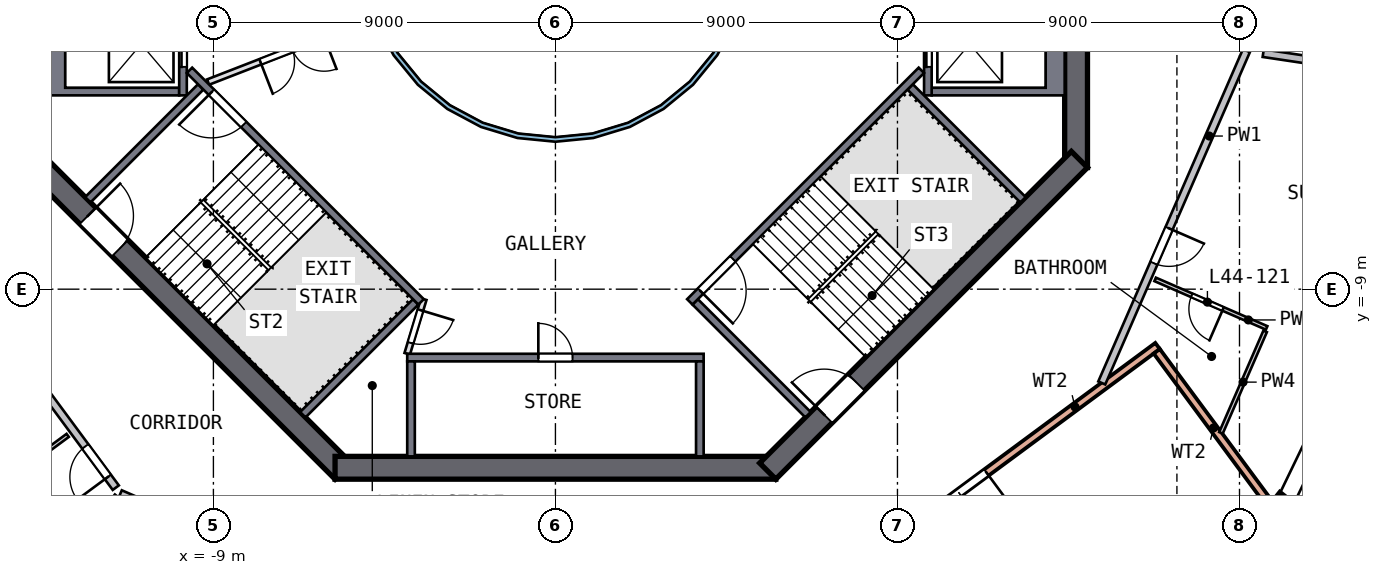
"""IFC4 building model, lengths in metres.
Left out: names, types, materials, properties, quantities, classifications, styles, units other than length and angle.
Written with IfcOpenShell. Run it as: python <this file> out.ifc"""

import sys

from ifc_helpers import new_model, si_unit, direction, frame, frame_2d, origin, origin_2d, place, context, subcontext, project, spatial, polyline, rectangle, outline, extrude, element, fill, save


model = new_model("IFC4")
c1 = context("Model", 3, precision=1e-05, world=origin(), true_north=direction((0.0, 1.0)))
c2 = subcontext(c1, "Body", "Model", "MODEL_VIEW")
j1 = project(units=[si_unit("LENGTHUNIT", "METRE"), si_unit("PLANEANGLEUNIT", "RADIAN")], contexts=[c1])
p1 = place(None, origin())
s1 = spatial("IfcSite", under=j1, at=p1, CompositionType="ELEMENT")
p2 = place(p1, origin())
s2 = spatial("IfcBuilding", under=s1, at=p2, CompositionType="ELEMENT")
p3 = place(p2, frame((0.0, 0.0, 183.5)))
s3 = spatial("IfcBuildingStorey", under=s2, at=p3, CompositionType="ELEMENT", Elevation=183.5)
p4 = place(p3, frame((18.977, -15.106, 0.0), z_axis=(0.07108209, 0.090848232, 0.993324688), x_axis=(-0.618726057, -0.777092625, 0.115347815)))
e1 = element("IfcColumn", 1, at=p4, inside=s3, PredefinedType="COLUMN", context=c2, shape_type="SweptSolid", body=[
    extrude(rectangle(XDim=1.0, YDim=0.8, at=origin_2d()), origin(), (0.0, 0.0, 1.0), 3.211),
])
p5 = place(p3, frame((13.7, -5.799, 0.0), z_axis=(0.0, 0.0, 1.0), x_axis=(0.0, 1.0, 0.0)))
e2 = element("IfcWall", 2, at=p5, inside=s3, PredefinedType="SHEAR", context=c2, shape_type="SweptSolid", body=[
    extrude(rectangle(XDim=11.598, YDim=0.6, at=frame_2d((5.799, 0.0))), origin(), (0.0, 0.0, 1.0), 3.5),
])
p6 = place(p5, frame((4.899, 0.0, 0.0)))
e3 = element("IfcOpeningElement", 3, at=p6, cuts=e2, PredefinedType="OPENING", context=c2, shape_type="SweptSolid", body=[
    extrude(rectangle(XDim=1.8, YDim=2.1, at=frame_2d((0.9, 1.05))), frame((0.0, 0.31, 0.0), z_axis=(0.0, -1.0, 0.0), x_axis=(1.0, 0.0, 0.0)), (0.0, 0.0, 1.0), 0.62),
])
p7 = place(p3, frame((-13.788, -5.587, 0.0), z_axis=(0.0, 0.0, 1.0), x_axis=(0.707106781, -0.707106781, 0.0)))
e4 = element("IfcWall", 4, at=p7, inside=s3, PredefinedType="SHEAR", context=c2, shape_type="SweptSolid", body=[
    extrude(rectangle(XDim=11.598, YDim=0.6, at=frame_2d((5.799, 0.0))), origin(), (0.0, 0.0, 1.0), 3.5),
])
p8 = place(p7, frame((2.099, 0.0, 0.0)))
e5 = element("IfcOpeningElement", 5, at=p8, cuts=e4, PredefinedType="OPENING", context=c2, shape_type="SweptSolid", body=[
    extrude(rectangle(XDim=1.2, YDim=2.1, at=frame_2d((0.6, 1.05))), frame((0.0, 0.31, 0.0), z_axis=(0.0, -1.0, 0.0), x_axis=(1.0, 0.0, 0.0)), (0.0, 0.0, 1.0), 0.62),
])
p9 = place(p3, frame((-5.799, -13.7, 0.0), z_axis=(0.0, 0.0, 1.0), x_axis=(1.0, 0.0, 0.0)))
e6 = element("IfcWall", 6, at=p9, inside=s3, PredefinedType="SHEAR", context=c2, shape_type="SweptSolid", body=[
    extrude(rectangle(XDim=11.598, YDim=0.6, at=frame_2d((5.799, 0.0))), origin(), (0.0, 0.0, 1.0), 3.5),
])
p10 = place(p3, frame((5.587, -13.788, 0.0), z_axis=(0.0, 0.0, 1.0), x_axis=(0.707106781, 0.707106781, 0.0)))
e7 = element("IfcWall", 7, at=p10, inside=s3, PredefinedType="SHEAR", context=c2, shape_type="SweptSolid", body=[
    extrude(rectangle(XDim=11.598, YDim=0.6, at=frame_2d((5.799, 0.0))), origin(), (0.0, 0.0, 1.0), 3.5),
])
p11 = place(p10, frame((2.099, 0.0, 0.0)))
e8 = element("IfcOpeningElement", 8, at=p11, cuts=e7, PredefinedType="OPENING", context=c2, shape_type="SweptSolid", body=[
    extrude(rectangle(XDim=1.2, YDim=2.1, at=frame_2d((0.6, 1.05))), frame((0.0, 0.31, 0.0), z_axis=(0.0, -1.0, 0.0), x_axis=(1.0, 0.0, 0.0)), (0.0, 0.0, 1.0), 0.62),
])
p12 = place(p3, frame((15.844, -10.495, 0.0), z_axis=(0.0, 0.0, 1.0), x_axis=(-0.804058258, -0.594550517, 0.0)))
e9 = element("IfcWall", 9, at=p12, inside=s3, PredefinedType="SOLIDWALL", context=c2, shape_type="SweptSolid", body=[
    extrude(rectangle(XDim=13.0, YDim=0.2, at=frame_2d((6.5, 0.0))), origin(), (0.0, 0.0, 1.0), 3.19),
])
p13 = place(p12, frame((5.6, 0.0, 0.0)))
e10 = element("IfcOpeningElement", 10, at=p13, cuts=e9, PredefinedType="OPENING", context=c2, shape_type="SweptSolid", body=[
    extrude(rectangle(XDim=1.8, YDim=2.4, at=frame_2d((0.9, 1.2))), frame((0.0, 0.11, 0.0), z_axis=(0.0, -1.0, 0.0), x_axis=(1.0, 0.0, 0.0)), (0.0, 0.0, 1.0), 0.22),
])
p14 = place(p3, frame((18.808, -14.671, 0.0), z_axis=(0.0, 0.0, 1.0), x_axis=(-0.594546939, 0.804060904, 0.0)))
e11 = element("IfcWall", 11, at=p14, inside=s3, PredefinedType="SOLIDWALL", context=c2, shape_type="SweptSolid", body=[
    extrude(rectangle(XDim=5.02, YDim=0.2, at=frame_2d((2.51, 0.0))), origin(), (0.0, 0.0, 1.0), 3.19),
])
p15 = place(p3, origin())
e12 = element("IfcWall", 12, at=p15, inside=s3, PredefinedType="SOLIDWALL", context=c2, shape_type="SweptSolid", body=[
    extrude(outline(polyline([(13.4, -3.9), (9.9, -3.9), (9.9, -3.7), (12.9, -3.7), (12.9, -1.4), (9.9, -1.4), (9.9, -1.2), (13.4, -1.2), (13.4, -3.9)])), origin(), (0.0, 0.0, 1.0), 3.19),
])
p16 = place(p3, frame((9.8, -1.2, 0.0), z_axis=(0.0, 0.0, 1.0), x_axis=(0.0, -1.0, 0.0)))
e13 = element("IfcWall", 13, at=p16, inside=s3, PredefinedType="SOLIDWALL", context=c2, shape_type="SweptSolid", body=[
    extrude(rectangle(XDim=2.7, YDim=0.2, at=frame_2d((1.35, 0.0))), origin(), (0.0, 0.0, 1.0), 3.19),
])
p17 = place(p16, frame((0.75, 0.0, 0.0)))
e14 = element("IfcOpeningElement", 14, at=p17, cuts=e13, PredefinedType="OPENING", context=c2, shape_type="SweptSolid", body=[
    extrude(rectangle(XDim=1.2, YDim=2.1, at=frame_2d((0.6, 1.05))), frame((0.0, 0.11, 0.0), z_axis=(0.0, -1.0, 0.0), x_axis=(1.0, 0.0, 0.0)), (0.0, 0.0, 1.0), 0.22),
])
p18 = place(p3, origin())
e15 = element("IfcWall", 15, at=p18, inside=s3, PredefinedType="SOLIDWALL", context=c2, shape_type="SweptSolid", body=[
    extrude(outline(polyline([(-13.4, -3.9), (-13.4, -1.2), (-9.9, -1.2), (-9.9, -1.4), (-12.9, -1.4), (-12.9, -3.7), (-9.9, -3.7), (-9.9, -3.9), (-13.4, -3.9)])), origin(), (0.0, 0.0, 1.0), 3.19),
])
p19 = place(p3, frame((-9.8, -1.2, 0.0), z_axis=(0.0, 0.0, 1.0), x_axis=(0.0, -1.0, 0.0)))
e16 = element("IfcWall", 16, at=p19, inside=s3, PredefinedType="SOLIDWALL", context=c2, shape_type="SweptSolid", body=[
    extrude(rectangle(XDim=2.7, YDim=0.2, at=frame_2d((1.35, 0.0))), origin(), (0.0, 0.0, 1.0), 3.19),
])
p20 = place(p19, frame((0.75, 0.0, 0.0)))
e17 = element("IfcOpeningElement", 17, at=p20, cuts=e16, PredefinedType="OPENING", context=c2, shape_type="SweptSolid", body=[
    extrude(rectangle(XDim=1.2, YDim=2.1, at=frame_2d((0.6, 1.05))), frame((0.0, 0.11, 0.0), z_axis=(0.0, -1.0, 0.0), x_axis=(1.0, 0.0, 0.0)), (0.0, 0.0, 1.0), 0.22),
])
p21 = place(p3, frame((-3.9, -10.8, 0.0), z_axis=(0.0, 0.0, 1.0), x_axis=(1.0, 0.0, 0.0)))
e18 = element("IfcWall", 18, at=p21, inside=s3, PredefinedType="SOLIDWALL", context=c2, shape_type="SweptSolid", body=[
    extrude(rectangle(XDim=7.8, YDim=0.2, at=frame_2d((3.9, 0.0))), origin(), (0.0, 0.0, 1.0), 3.19),
])
p22 = place(p21, frame((3.45, 0.0, 0.0)))
e19 = element("IfcOpeningElement", 19, at=p22, cuts=e18, PredefinedType="OPENING", context=c2, shape_type="SweptSolid", body=[
    extrude(rectangle(XDim=0.9, YDim=2.1, at=frame_2d((0.45, 1.05))), frame((0.0, 0.11, 0.0), z_axis=(0.0, -1.0, 0.0), x_axis=(1.0, 0.0, 0.0)), (0.0, 0.0, 1.0), 0.22),
])
for number, where, z_axis, x_axis in (
    (20, (-3.8, -10.9, 0.0), (0.0, 0.0, 1.0), (0.0, -1.0, 0.0)),
    (21, (3.8, -10.9, 0.0), (0.0, 0.0, 1.0), (0.0, -1.0, 0.0)),
):
    element("IfcWall", number, at=place(p3, frame(where, z_axis=z_axis, x_axis=x_axis)), inside=s3, PredefinedType="SOLIDWALL", context=c2, shape_type="SweptSolid", body=[
        extrude(rectangle(XDim=2.5, YDim=0.2, at=frame_2d((1.25, 0.0))), origin(), (0.0, 0.0, 1.0), 3.19),
    ])
p23 = place(p3, frame((-3.535, -9.334, 0.0), z_axis=(0.0, 0.0, 1.0), x_axis=(-0.707120946, 0.707092617, 0.0)))
e22 = element("IfcWall", 22, at=p23, inside=s3, PredefinedType="SOLIDWALL", context=c2, shape_type="SweptSolid", body=[
    extrude(rectangle(XDim=8.618, YDim=0.2, at=frame_2d((4.309, 0.0))), origin(), (0.0, 0.0, 1.0), 3.19),
])
p24 = place(p23, frame((6.6, 0.0, 0.0)))
e23 = element("IfcOpeningElement", 23, at=p24, cuts=e22, PredefinedType="OPENING", context=c2, shape_type="SweptSolid", body=[
    extrude(rectangle(XDim=1.2, YDim=2.1, at=frame_2d((0.6, 1.05))), frame((0.0, 0.11, 0.0), z_axis=(0.0, -1.0, 0.0), x_axis=(1.0, 0.0, 0.0)), (0.0, 0.0, 1.0), 0.22),
])
for number, where, z_axis, x_axis in (
    (24, (-9.334, -3.677, 0.0), (0.0, 0.0, 1.0), (-0.707, -0.707, 0.0)),
    (25, (-3.677, -9.334, 0.0), (0.0, 0.0, 1.0), (-0.707, -0.707, 0.0)),
):
    element("IfcWall", number, at=place(p3, frame(where, z_axis=z_axis, x_axis=x_axis)), inside=s3, PredefinedType="SOLIDWALL", context=c2, shape_type="SweptSolid", body=[
        extrude(rectangle(XDim=4.2, YDim=0.2, at=frame_2d((2.1, 0.0))), origin(), (0.0, 0.0, 1.0), 3.19),
    ])
p25 = place(p3, frame((9.629, -3.24, 0.0), z_axis=(0.0, 0.0, 1.0), x_axis=(-0.707120946, -0.707092617, 0.0)))
e26 = element("IfcWall", 26, at=p25, inside=s3, PredefinedType="SOLIDWALL", context=c2, shape_type="SweptSolid", body=[
    extrude(rectangle(XDim=8.618, YDim=0.2, at=frame_2d((4.309, 0.0))), origin(), (0.0, 0.0, 1.0), 3.19),
])
p26 = place(p25, frame((7.018, 0.0, 0.0)))
e27 = element("IfcOpeningElement", 27, at=p26, cuts=e26, PredefinedType="OPENING", context=c2, shape_type="SweptSolid", body=[
    extrude(rectangle(XDim=1.2, YDim=2.1, at=frame_2d((0.6, 1.05))), frame((0.0, 0.11, 0.0), z_axis=(0.0, -1.0, 0.0), x_axis=(1.0, 0.0, 0.0)), (0.0, 0.0, 1.0), 0.22),
])
for number, where, z_axis, x_axis in (
    (28, (3.677, -9.334, 0.0), (0.0, 0.0, 1.0), (0.707, -0.707, 0.0)),
    (29, (9.334, -3.677, 0.0), (0.0, 0.0, 1.0), (0.707, -0.707, 0.0)),
):
    element("IfcWall", number, at=place(p3, frame(where, z_axis=z_axis, x_axis=x_axis)), inside=s3, PredefinedType="SOLIDWALL", context=c2, shape_type="SweptSolid", body=[
        extrude(rectangle(XDim=4.2, YDim=0.2, at=frame_2d((2.1, 0.0))), origin(), (0.0, 0.0, 1.0), 3.19),
    ])
p27 = place(p3, frame((-3.465, -9.263, 0.0), z_axis=(0.0, 0.0, 1.0), x_axis=(-0.289808785, -0.957084567, 0.0)))
e30 = element("IfcWall", 30, at=p27, inside=s3, PredefinedType="PARTITIONING", context=c2, shape_type="SweptSolid", body=[
    extrude(rectangle(XDim=1.501, YDim=0.15, at=frame_2d((0.75, 0.0))), origin(), (0.0, 0.0, 1.0), 3.19),
])
p28 = place(p27, frame((0.301, 0.0, 0.0)))
e31 = element("IfcOpeningElement", 31, at=p28, cuts=e30, PredefinedType="OPENING", context=c2, shape_type="SweptSolid", body=[
    extrude(rectangle(XDim=0.9, YDim=2.1, at=frame_2d((0.45, 1.05))), frame((0.0, 0.085, 0.0), z_axis=(0.0, -1.0, 0.0), x_axis=(1.0, 0.0, 0.0)), (0.0, 0.0, 1.0), 0.17),
])
p29 = place(p3, frame((-4.782, -1.857, 0.0), z_axis=(0.0, 0.0, 1.0), x_axis=(-0.932157474, -0.362053096, 0.0)))
e32 = element("IfcWall", 32, at=p29, inside=s3, PredefinedType="PARTITIONING", context=c2, shape_type="SweptSolid", body=[
    extrude(rectangle(XDim=4.675, YDim=0.15, at=frame_2d((2.337, 0.0))), origin(), (0.0, 0.0, 1.0), 3.19),
])
p30 = place(p29, frame((1.4, 0.0, 0.0)))
e33 = element("IfcOpeningElement", 33, at=p30, cuts=e32, PredefinedType="OPENING", context=c2, shape_type="SweptSolid", body=[
    extrude(rectangle(XDim=1.8, YDim=2.1, at=frame_2d((0.9, 1.05))), frame((0.0, 0.085, 0.0), z_axis=(0.0, -1.0, 0.0), x_axis=(1.0, 0.0, 0.0)), (0.0, 0.0, 1.0), 0.17),
])
p31 = place(p3, origin())
e34 = element("IfcWall", 34, at=p31, inside=s3, PredefinedType="SOLIDWALL", context=c2, shape_type="SweptSolid", body=[
    extrude(outline(polyline([(5.021, -0.999), (4.73, -1.959), (4.257, -2.844), (3.62, -3.62), (2.844, -4.257), (1.959, -4.73), (0.999, -5.021), (0.0, -5.12), (-0.999, -5.021), (-1.959, -4.73), (-2.844, -4.257), (-3.62, -3.62), (-4.257, -2.844), (-4.73, -1.959), (-5.021, -0.999), (-5.12, 0.0), (-5.021, 0.999), (-4.73, 1.959), (-4.257, 2.844), (-3.62, 3.62), (-2.844, 4.257), (-1.959, 4.73), (-0.999, 5.021), (0.0, 5.12), (0.999, 5.021), (1.959, 4.73), (2.844, 4.257), (3.62, 3.62), (4.257, 2.844), (4.73, 1.959), (5.021, 0.999), (5.12, 0.0), (5.021, -0.999)]), holes=[polyline([(4.904, 0.976), (4.619, 1.913), (4.157, 2.778), (3.535, 3.535), (2.778, 4.157), (1.913, 4.619), (0.976, 4.904), (0.0, 5.0), (-0.976, 4.904), (-1.913, 4.619), (-2.778, 4.157), (-3.535, 3.535), (-4.157, 2.778), (-4.619, 1.913), (-4.904, 0.976), (-5.0, 0.0), (-4.904, -0.976), (-4.619, -1.913), (-4.157, -2.778), (-3.535, -3.535), (-2.778, -4.157), (-1.913, -4.619), (-0.976, -4.904), (0.0, -5.0), (0.976, -4.904), (1.913, -4.619), (2.778, -4.157), (3.535, -3.535), (4.157, -2.778), (4.619, -1.913), (4.904, -0.976), (5.0, 0.0), (4.904, 0.976)])]), origin(), (0.0, 0.0, 1.0), 3.19),
])
p32 = place(p3, frame((-11.569, -14.223, 0.0), z_axis=(0.0, 0.0, 1.0), x_axis=(-0.594544652, 0.804062595, 0.0)))
e35 = element("IfcWall", 35, at=p32, inside=s3, PredefinedType="SOLIDWALL", context=c2, shape_type="SweptSolid", body=[
    extrude(rectangle(XDim=9.117, YDim=0.2, at=frame_2d((4.559, 0.0))), origin(), (0.0, 0.0, 1.0), 3.19),
])
p33 = place(p32, frame((0.35, 0.0, 0.0)))
e36 = element("IfcOpeningElement", 36, at=p33, cuts=e35, PredefinedType="OPENING", context=c2, shape_type="SweptSolid", body=[
    extrude(rectangle(XDim=1.0, YDim=2.1, at=frame_2d((0.5, 1.05))), frame((0.0, 0.11, 0.0), z_axis=(0.0, -1.0, 0.0), x_axis=(1.0, 0.0, 0.0)), (0.0, 0.0, 1.0), 0.22),
])
p34 = place(p3, frame((-2.724, -18.182, 0.0), z_axis=(0.0, 0.0, 1.0), x_axis=(-0.916915816, 0.399080676, 0.0)))
e37 = element("IfcWall", 37, at=p34, inside=s3, PredefinedType="SOLIDWALL", context=c2, shape_type="SweptSolid", body=[
    extrude(rectangle(XDim=9.517, YDim=0.2, at=frame_2d((4.758, 0.0))), origin(), (0.0, 0.0, 1.0), 3.19),
])
p35 = place(p34, frame((3.869, 0.0, 0.0)))
e38 = element("IfcOpeningElement", 38, at=p35, cuts=e37, PredefinedType="OPENING", context=c2, shape_type="SweptSolid", body=[
    extrude(rectangle(XDim=1.8, YDim=2.1, at=frame_2d((0.9, 1.05))), frame((0.0, 0.11, 0.0), z_axis=(0.0, -1.0, 0.0), x_axis=(1.0, 0.0, 0.0)), (0.0, 0.0, 1.0), 0.22),
])
p36 = place(p3, frame((18.182, -2.724, 0.0), z_axis=(0.0, 0.0, 1.0), x_axis=(-0.399057465, -0.916925918, 0.0)))
e39 = element("IfcWall", 39, at=p36, inside=s3, PredefinedType="SOLIDWALL", context=c2, shape_type="SweptSolid", body=[
    extrude(rectangle(XDim=9.537, YDim=0.2, at=frame_2d((4.768, 0.0))), origin(), (0.0, 0.0, 1.0), 3.19),
])
p37 = place(p36, frame((5.1, 0.0, 0.0)))
e40 = element("IfcOpeningElement", 40, at=p37, cuts=e39, PredefinedType="OPENING", context=c2, shape_type="SweptSolid", body=[
    extrude(rectangle(XDim=1.0, YDim=2.1, at=frame_2d((0.5, 1.05))), frame((0.0, 0.11, 0.0), z_axis=(0.0, -1.0, 0.0), x_axis=(1.0, 0.0, 0.0)), (0.0, 0.0, 1.0), 0.22),
])
p38 = place(p3, frame((24.689, -3.698, 0.0), z_axis=(0.0, 0.0, 1.0), x_axis=(-0.988965537, 0.148145763, 0.0)))
e41 = element("IfcWall", 41, at=p38, inside=s3, PredefinedType="SOLIDWALL", context=c2, shape_type="SweptSolid", body=[
    extrude(rectangle(XDim=6.132, YDim=0.2, at=frame_2d((3.066, 0.0))), origin(), (0.0, 0.0, 1.0), 3.19),
])
p39 = place(p3, frame((-15.247, -14.632, 0.0), z_axis=(0.0, 0.0, 1.0), x_axis=(0.804044201, 0.594569527, 0.0)))
e42 = element("IfcWall", 42, at=p39, inside=s3, PredefinedType="PARTITIONING", context=c2, shape_type="SweptSolid", body=[
    extrude(rectangle(XDim=3.0, YDim=0.1, at=frame_2d((1.5, 0.0))), origin(), (0.0, 0.0, 1.0), 3.19),
])
p40 = place(p39, frame((1.15, 0.0, 0.0)))
e43 = element("IfcOpeningElement", 43, at=p40, cuts=e42, PredefinedType="OPENING", context=c2, shape_type="SweptSolid", body=[
    extrude(rectangle(XDim=0.9, YDim=2.1, at=frame_2d((0.45, 1.05))), frame((0.0, 0.06, 0.0), z_axis=(0.0, -1.0, 0.0), x_axis=(1.0, 0.0, 0.0)), (0.0, 0.0, 1.0), 0.12),
])
p41 = place(p3, frame((18.715, -10.019, 0.0), z_axis=(0.0, 0.0, 1.0), x_axis=(-0.91692081, 0.399069203, 0.0)))
e44 = element("IfcWall", 44, at=p41, inside=s3, PredefinedType="PARTITIONING", context=c2, shape_type="SweptSolid", body=[
    extrude(rectangle(XDim=3.2, YDim=0.1, at=frame_2d((1.6, 0.0))), origin(), (0.0, 0.0, 1.0), 3.19),
])
p42 = place(p41, frame((1.25, 0.0, 0.0)))
e45 = element("IfcOpeningElement", 45, at=p42, cuts=e44, PredefinedType="OPENING", context=c2, shape_type="SweptSolid", body=[
    extrude(rectangle(XDim=0.9, YDim=2.1, at=frame_2d((0.45, 1.05))), frame((0.0, 0.06, 0.0), z_axis=(0.0, -1.0, 0.0), x_axis=(1.0, 0.0, 0.0)), (0.0, 0.0, 1.0), 0.12),
])
p43 = place(p3, frame((18.675, -10.111, 0.0), z_axis=(0.0, 0.0, 1.0), x_axis=(-0.399063298, -0.91692338, 0.0)))
e46 = element("IfcWall", 46, at=p43, inside=s3, PredefinedType="PARTITIONING", context=c2, shape_type="SweptSolid", body=[
    extrude(rectangle(XDim=2.912, YDim=0.1, at=frame_2d((1.456, 0.0))), origin(), (0.0, 0.0, 1.0), 3.19),
])
p44 = place(p13, origin())
e47 = element("IfcDoor", 47, at=p44, inside=s3, OperationType="DOUBLE_DOOR_SINGLE_SWING", PredefinedType="DOOR", context=c2, shape_type="SweptSolid", body=[
    extrude(rectangle(XDim=1.8, YDim=2.4, at=frame_2d((0.9, 1.2))), frame((0.0, 0.025, 0.0), z_axis=(0.0, -1.0, 0.0), x_axis=(1.0, 0.0, 0.0)), (0.0, 0.0, 1.0), 0.05),
])
fill(e10, e47)
p45 = place(p22, origin())
e48 = element("IfcDoor", 48, at=p45, inside=s3, OperationType="SINGLE_SWING_LEFT", PredefinedType="DOOR", context=c2, shape_type="SweptSolid", body=[
    extrude(rectangle(XDim=0.9, YDim=2.1, at=frame_2d((0.45, 1.05))), frame((0.0, 0.025, 0.0), z_axis=(0.0, -1.0, 0.0), x_axis=(1.0, 0.0, 0.0)), (0.0, 0.0, 1.0), 0.05),
])
fill(e19, e48)
p46 = place(p17, origin())
e49 = element("IfcDoor", 49, at=p46, inside=s3, OperationType="DOUBLE_DOOR_SLIDING", PredefinedType="DOOR", context=c2, shape_type="SweptSolid", body=[
    extrude(rectangle(XDim=1.2, YDim=2.1, at=frame_2d((0.6, 1.05))), frame((0.0, 0.025, 0.0), z_axis=(0.0, -1.0, 0.0), x_axis=(1.0, 0.0, 0.0)), (0.0, 0.0, 1.0), 0.05),
])
fill(e14, e49)
p47 = place(p20, origin())
e50 = element("IfcDoor", 50, at=p47, inside=s3, OperationType="DOUBLE_DOOR_SLIDING", PredefinedType="DOOR", context=c2, shape_type="SweptSolid", body=[
    extrude(rectangle(XDim=1.2, YDim=2.1, at=frame_2d((0.6, 1.05))), frame((0.0, 0.025, 0.0), z_axis=(0.0, -1.0, 0.0), x_axis=(1.0, 0.0, 0.0)), (0.0, 0.0, 1.0), 0.05),
])
fill(e17, e50)
p48 = place(p24, origin())
e51 = element("IfcDoor", 51, at=p48, inside=s3, OperationType="SINGLE_SWING_RIGHT", PredefinedType="DOOR", context=c2, shape_type="SweptSolid", body=[
    extrude(rectangle(XDim=1.2, YDim=2.1, at=frame_2d((0.6, 1.05))), frame((0.0, 0.025, 0.0), z_axis=(0.0, -1.0, 0.0), x_axis=(1.0, 0.0, 0.0)), (0.0, 0.0, 1.0), 0.05),
])
fill(e23, e51)
p49 = place(p26, origin())
e52 = element("IfcDoor", 52, at=p49, inside=s3, OperationType="SINGLE_SWING_RIGHT", PredefinedType="DOOR", context=c2, shape_type="SweptSolid", body=[
    extrude(rectangle(XDim=1.2, YDim=2.1, at=frame_2d((0.6, 1.05))), frame((0.0, 0.025, 0.0), z_axis=(0.0, -1.0, 0.0), x_axis=(1.0, 0.0, 0.0)), (0.0, 0.0, 1.0), 0.05),
])
fill(e27, e52)
p50 = place(p8, origin())
e53 = element("IfcDoor", 53, at=p50, inside=s3, OperationType="SINGLE_SWING_LEFT", PredefinedType="DOOR", context=c2, shape_type="SweptSolid", body=[
    extrude(rectangle(XDim=1.2, YDim=2.1, at=frame_2d((0.6, 1.05))), frame((0.0, 0.025, 0.0), z_axis=(0.0, -1.0, 0.0), x_axis=(1.0, 0.0, 0.0)), (0.0, 0.0, 1.0), 0.05),
])
fill(e5, e53)
p51 = place(p11, origin())
e54 = element("IfcDoor", 54, at=p51, inside=s3, OperationType="SINGLE_SWING_LEFT", PredefinedType="DOOR", context=c2, shape_type="SweptSolid", body=[
    extrude(rectangle(XDim=1.2, YDim=2.1, at=frame_2d((0.6, 1.05))), frame((0.0, 0.025, 0.0), z_axis=(0.0, -1.0, 0.0), x_axis=(1.0, 0.0, 0.0)), (0.0, 0.0, 1.0), 0.05),
])
fill(e8, e54)
p52 = place(p28, origin())
e55 = element("IfcDoor", 55, at=p52, inside=s3, OperationType="SINGLE_SWING_LEFT", PredefinedType="DOOR", context=c2, shape_type="SweptSolid", body=[
    extrude(rectangle(XDim=0.9, YDim=2.1, at=frame_2d((0.45, 1.05))), frame((0.0, 0.025, 0.0), z_axis=(0.0, -1.0, 0.0), x_axis=(1.0, 0.0, 0.0)), (0.0, 0.0, 1.0), 0.05),
])
fill(e31, e55)
p53 = place(p30, origin())
e56 = element("IfcDoor", 56, at=p53, inside=s3, OperationType="DOUBLE_DOOR_SINGLE_SWING", PredefinedType="DOOR", context=c2, shape_type="SweptSolid", body=[
    extrude(rectangle(XDim=1.8, YDim=2.1, at=frame_2d((0.9, 1.05))), frame((0.0, 0.025, 0.0), z_axis=(0.0, -1.0, 0.0), x_axis=(1.0, 0.0, 0.0)), (0.0, 0.0, 1.0), 0.05),
])
fill(e33, e56)
p54 = place(p33, origin())
e57 = element("IfcDoor", 57, at=p54, inside=s3, OperationType="SINGLE_SWING_LEFT", PredefinedType="DOOR", context=c2, shape_type="SweptSolid", body=[
    extrude(rectangle(XDim=1.0, YDim=2.1, at=frame_2d((0.5, 1.05))), frame((0.0, 0.025, 0.0), z_axis=(0.0, -1.0, 0.0), x_axis=(1.0, 0.0, 0.0)), (0.0, 0.0, 1.0), 0.05),
])
fill(e36, e57)
p55 = place(p37, origin())
e58 = element("IfcDoor", 58, at=p55, inside=s3, OperationType="SINGLE_SWING_LEFT", PredefinedType="DOOR", context=c2, shape_type="SweptSolid", body=[
    extrude(rectangle(XDim=1.0, YDim=2.1, at=frame_2d((0.5, 1.05))), frame((0.0, 0.025, 0.0), z_axis=(0.0, -1.0, 0.0), x_axis=(1.0, 0.0, 0.0)), (0.0, 0.0, 1.0), 0.05),
])
fill(e40, e58)
p56 = place(p42, origin())
e59 = element("IfcDoor", 59, at=p56, inside=s3, OperationType="SINGLE_SWING_LEFT", PredefinedType="DOOR", context=c2, shape_type="SweptSolid", body=[
    extrude(rectangle(XDim=0.9, YDim=2.1, at=frame_2d((0.45, 1.05))), frame((0.0, 0.025, 0.0), z_axis=(0.0, -1.0, 0.0), x_axis=(1.0, 0.0, 0.0)), (0.0, 0.0, 1.0), 0.05),
])
fill(e45, e59)
save(model, sys.argv[1])
